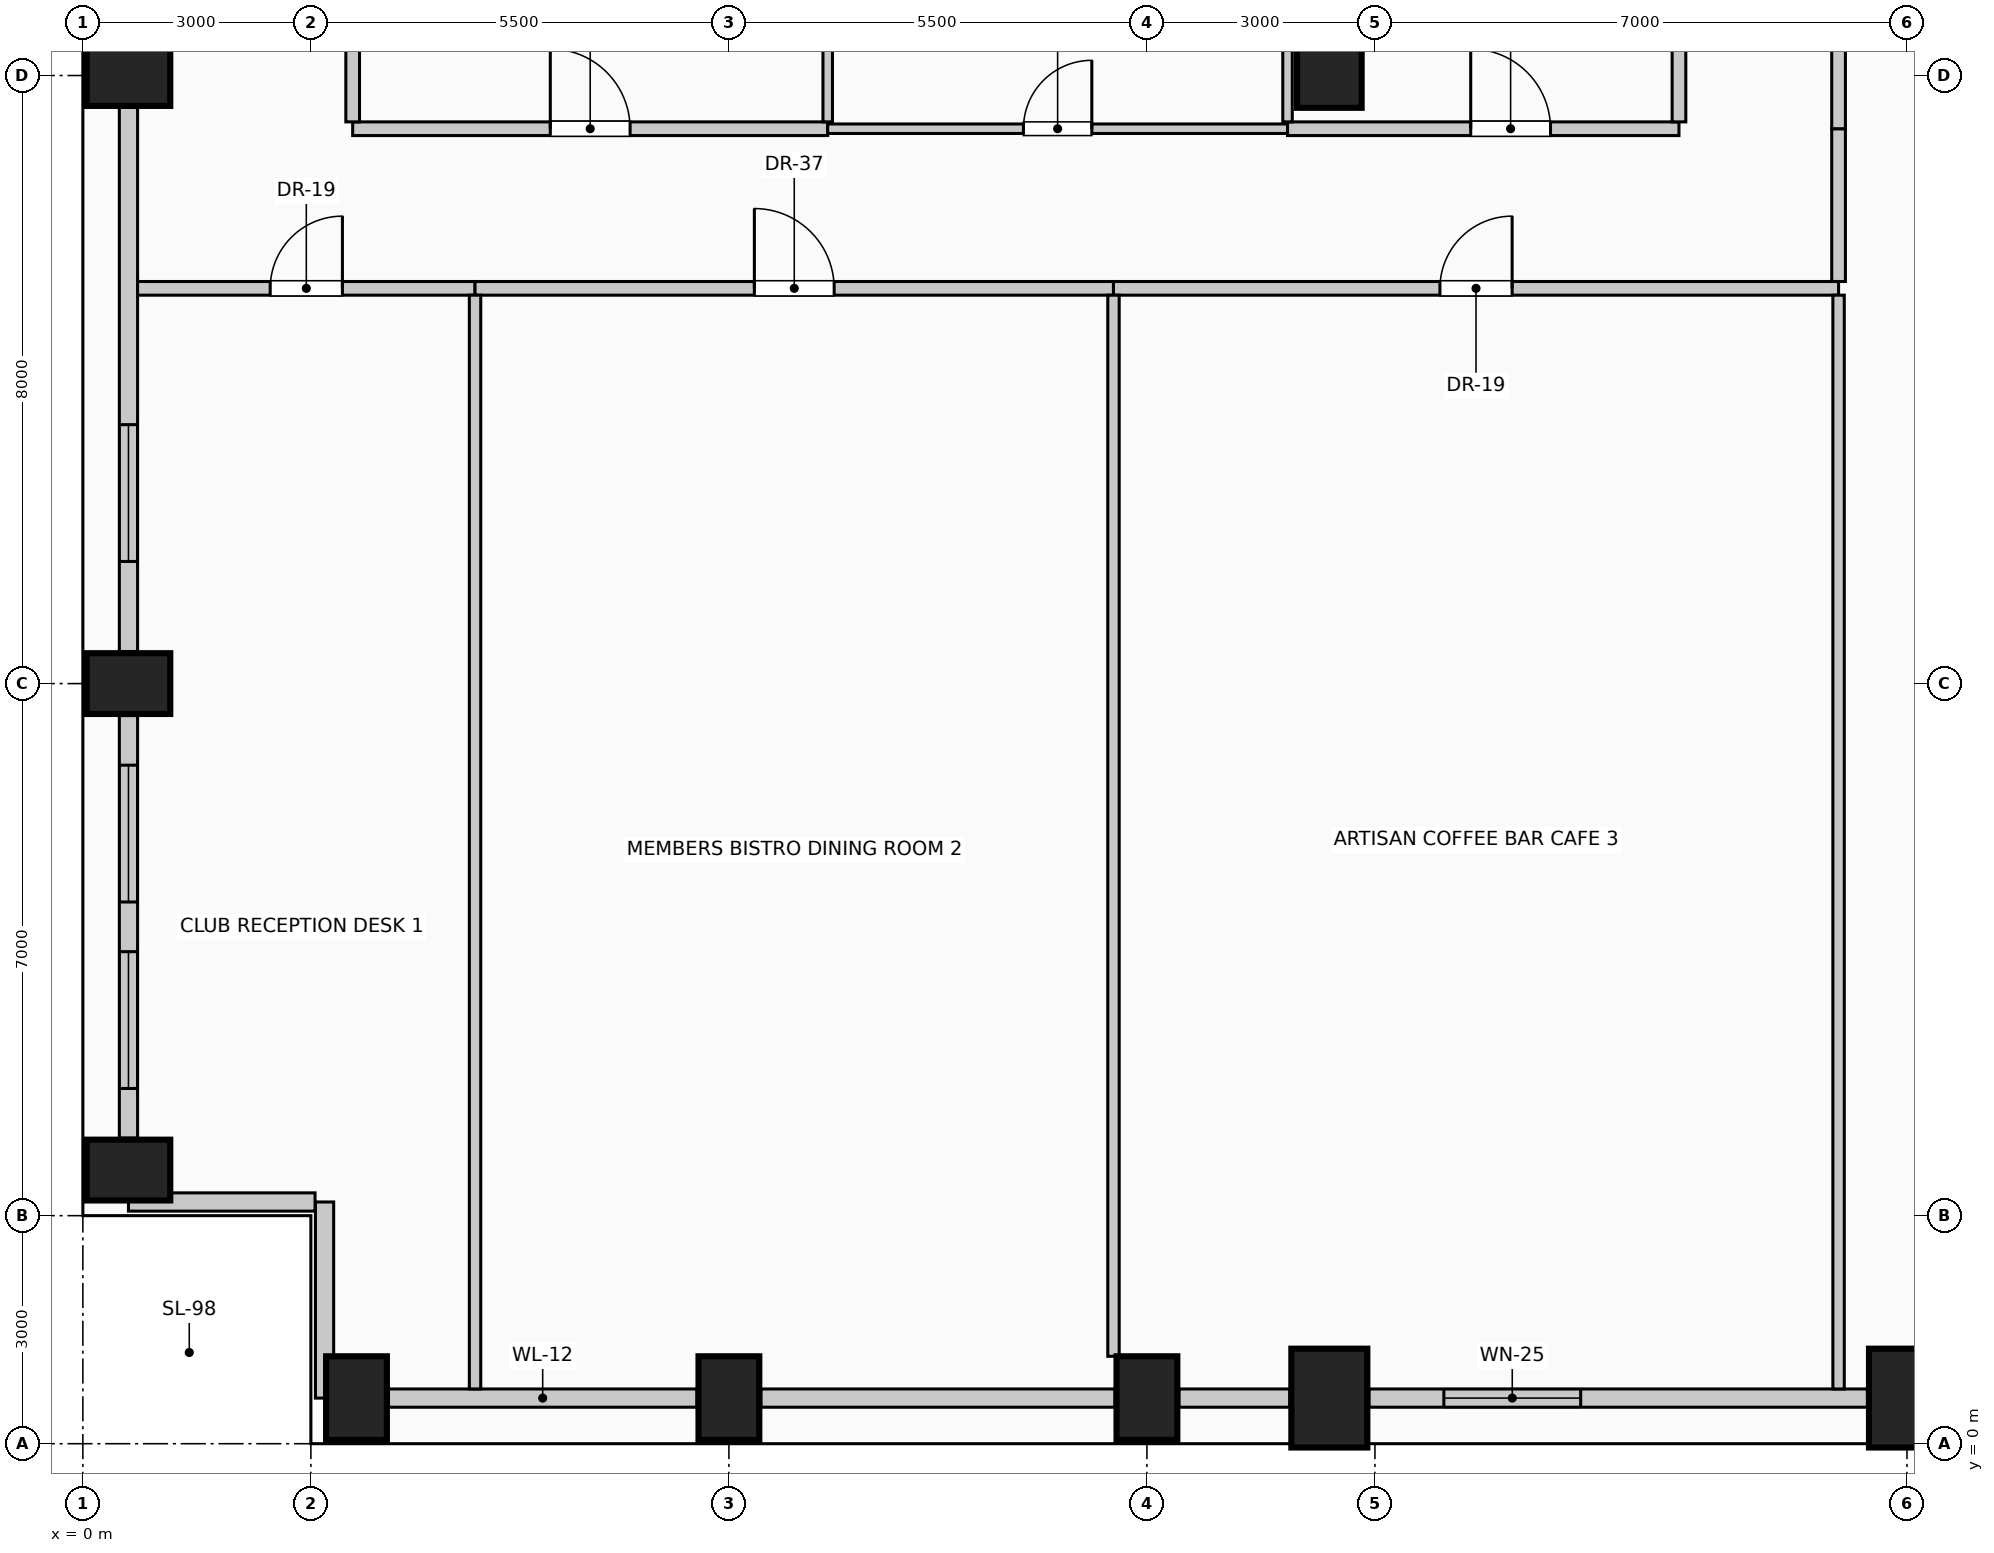
"""IFC4 building model, lengths in metres.
Left out: names, types, materials, properties, quantities, classifications, styles, units other than length and angle.
Written with IfcOpenShell. Run it as: python <this file> out.ifc"""

import sys

from ifc_helpers import new_model, si_unit, direction, frame, frame_2d, origin, origin_2d, place, context, subcontext, project, spatial, rectangle, circle, extrude, element, fill, save


model = new_model("IFC4")
c1 = context("Model", 3, precision=1e-05, world=origin(), true_north=direction((0.0, 1.0)))
c2 = subcontext(c1, "Body", "Model", "MODEL_VIEW")
j1 = project(units=[si_unit("LENGTHUNIT", "METRE"), si_unit("PLANEANGLEUNIT", "RADIAN")], contexts=[c1])
p1 = place(None, origin())
s1 = spatial("IfcSite", under=j1, at=p1, CompositionType="ELEMENT")
p2 = place(p1, origin())
s2 = spatial("IfcBuilding", under=s1, at=p2, CompositionType="ELEMENT")
p3 = place(p2, frame((0.0, 0.0, 174.6)))
s3 = spatial("IfcBuildingStorey", under=s2, at=p3, CompositionType="ELEMENT", Elevation=174.6)
for number, where, z_axis, x_axis in (
    (1, (3.6, 0.6, 0.0), (0.0, 0.0, 1.0), (1.0, 0.0, 0.0)),
    (2, (8.5, 0.6, 0.0), (0.0, 0.0, 1.0), (1.0, 0.0, 0.0)),
    (3, (14.0, 0.6, 0.0), (0.0, 0.0, 1.0), (1.0, 0.0, 0.0)),
):
    element("IfcColumn", number, at=place(p3, frame(where, z_axis=z_axis, x_axis=x_axis)), inside=s3, PredefinedType="COLUMN", context=c2, shape_type="SweptSolid", body=[
        extrude(rectangle(XDim=0.8, YDim=1.1, at=origin_2d()), origin(), (0.0, 0.0, 1.0), 4.0),
    ])
for number, where, z_axis, x_axis in (
    (4, (16.4, 0.6, 0.0), (0.0, 0.0, 1.0), (1.0, 0.0, 0.0)),
    (5, (24.0, 0.6, 0.0), (0.0, 0.0, 1.0), (1.0, 0.0, 0.0)),
):
    element("IfcColumn", number, at=place(p3, frame(where, z_axis=z_axis, x_axis=x_axis)), inside=s3, PredefinedType="COLUMN", context=c2, shape_type="SweptSolid", body=[
        extrude(rectangle(XDim=1.0, YDim=1.3, at=origin_2d()), origin(), (0.0, 0.0, 1.0), 4.0),
    ])
for number, where, z_axis, x_axis in (
    (6, (0.6, 3.6, 0.0), (0.0, 0.0, 1.0), (0.0, 1.0, 0.0)),
    (7, (0.6, 10.0, 0.0), (0.0, 0.0, 1.0), (0.0, 1.0, 0.0)),
    (8, (0.6, 18.0, 0.0), (0.0, 0.0, 1.0), (0.0, 1.0, 0.0)),
):
    element("IfcColumn", number, at=place(p3, frame(where, z_axis=z_axis, x_axis=x_axis)), inside=s3, PredefinedType="COLUMN", context=c2, shape_type="SweptSolid", body=[
        extrude(rectangle(XDim=0.8, YDim=1.1, at=origin_2d()), origin(), (0.0, 0.0, 1.0), 4.0),
    ])
p4 = place(p3, frame((16.4, 18.0, 0.0), z_axis=(0.0, 0.0, 1.0), x_axis=(1.0, 0.0, 0.0)))
e9 = element("IfcColumn", 9, at=p4, inside=s3, PredefinedType="COLUMN", context=c2, shape_type="SweptSolid", body=[
    extrude(circle(Radius=0.425, at=origin_2d()), origin(), (0.0, 0.0, 1.0), 4.0),
])
p5 = place(p3, frame((8.08, 0.6, 0.0), z_axis=(0.0, 0.0, 1.0), x_axis=(-1.0, 0.0, 0.0)))
e10 = element("IfcWall", 10, at=p5, inside=s3, PredefinedType="SOLIDWALL", context=c2, shape_type="SweptSolid", body=[
    extrude(rectangle(XDim=4.06, YDim=0.24, at=frame_2d((2.03, 0.0))), origin(), (0.0, 0.0, 1.0), 2.975),
])
p6 = place(p3, frame((13.58, 0.6, 0.0), z_axis=(0.0, 0.0, 1.0), x_axis=(-1.0, 0.0, 0.0)))
e11 = element("IfcWall", 11, at=p6, inside=s3, PredefinedType="SOLIDWALL", context=c2, shape_type="SweptSolid", body=[
    extrude(rectangle(XDim=4.66, YDim=0.24, at=frame_2d((2.33, 0.0))), origin(), (0.0, 0.0, 1.0), 2.975),
])
p7 = place(p3, frame((15.88, 0.6, 0.0), z_axis=(0.0, 0.0, 1.0), x_axis=(-1.0, 0.0, 0.0)))
e12 = element("IfcWall", 12, at=p7, inside=s3, PredefinedType="SOLIDWALL", context=c2, shape_type="SweptSolid", body=[
    extrude(rectangle(XDim=1.46, YDim=0.24, at=frame_2d((0.73, 0.0))), origin(), (0.0, 0.0, 1.0), 2.975),
])
p8 = place(p3, frame((23.48, 0.6, 0.0), z_axis=(0.0, 0.0, 1.0), x_axis=(-1.0, 0.0, 0.0)))
e13 = element("IfcWall", 13, at=p8, inside=s3, PredefinedType="SOLIDWALL", context=c2, shape_type="SweptSolid", body=[
    extrude(rectangle(XDim=6.56, YDim=0.24, at=frame_2d((3.28, 0.0))), origin(), (0.0, 0.0, 1.0), 2.975),
])
p9 = place(p8, frame((3.773, 0.0, 0.42)))
e14 = element("IfcOpeningElement", 14, at=p9, cuts=e13, PredefinedType="OPENING", context=c2, shape_type="SweptSolid", body=[
    extrude(rectangle(XDim=1.8, YDim=2.2, at=frame_2d((0.9, 1.1))), frame((0.0, 0.13, 0.0), z_axis=(0.0, -1.0, 0.0), x_axis=(1.0, 0.0, 0.0)), (0.0, 0.0, 1.0), 0.26),
])
p10 = place(p3, frame((0.6, 4.02, 0.0), z_axis=(0.0, 0.0, 1.0), x_axis=(0.0, 1.0, 0.0)))
e15 = element("IfcWall", 15, at=p10, inside=s3, PredefinedType="SOLIDWALL", context=c2, shape_type="SweptSolid", body=[
    extrude(rectangle(XDim=5.56, YDim=0.24, at=frame_2d((2.78, 0.0))), origin(), (0.0, 0.0, 1.0), 2.975),
])
p11 = place(p10, frame((0.653, 0.0, 0.42)))
e16 = element("IfcOpeningElement", 16, at=p11, cuts=e15, PredefinedType="OPENING", context=c2, shape_type="SweptSolid", body=[
    extrude(rectangle(XDim=1.8, YDim=2.2, at=frame_2d((0.9, 1.1))), frame((0.0, 0.13, 0.0), z_axis=(0.0, -1.0, 0.0), x_axis=(1.0, 0.0, 0.0)), (0.0, 0.0, 1.0), 0.26),
])
p12 = place(p10, frame((3.107, 0.0, 0.42)))
e17 = element("IfcOpeningElement", 17, at=p12, cuts=e15, PredefinedType="OPENING", context=c2, shape_type="SweptSolid", body=[
    extrude(rectangle(XDim=1.8, YDim=2.2, at=frame_2d((0.9, 1.1))), frame((0.0, 0.13, 0.0), z_axis=(0.0, -1.0, 0.0), x_axis=(1.0, 0.0, 0.0)), (0.0, 0.0, 1.0), 0.26),
])
p13 = place(p3, frame((0.6, 10.42, 0.0), z_axis=(0.0, 0.0, 1.0), x_axis=(0.0, 1.0, 0.0)))
e18 = element("IfcWall", 18, at=p13, inside=s3, PredefinedType="SOLIDWALL", context=c2, shape_type="SweptSolid", body=[
    extrude(rectangle(XDim=7.16, YDim=0.24, at=frame_2d((3.58, 0.0))), origin(), (0.0, 0.0, 1.0), 2.975),
])
p14 = place(p13, frame((1.187, 0.0, 0.42)))
e19 = element("IfcOpeningElement", 19, at=p14, cuts=e18, PredefinedType="OPENING", context=c2, shape_type="SweptSolid", body=[
    extrude(rectangle(XDim=1.8, YDim=2.2, at=frame_2d((0.9, 1.1))), frame((0.0, 0.13, 0.0), z_axis=(0.0, -1.0, 0.0), x_axis=(1.0, 0.0, 0.0)), (0.0, 0.0, 1.0), 0.26),
])
p15 = place(p3, frame((3.18, 0.6, 0.0), z_axis=(0.0, 0.0, 1.0), x_axis=(0.0, 1.0, 0.0)))
e20 = element("IfcWall", 20, at=p15, inside=s3, PredefinedType="SOLIDWALL", context=c2, shape_type="SweptSolid", body=[
    extrude(rectangle(XDim=2.58, YDim=0.24, at=frame_2d((1.29, 0.0))), origin(), (0.0, 0.0, 1.0), 3.725),
])
p16 = place(p3, frame((3.055, 3.18, 0.0), z_axis=(0.0, 0.0, 1.0), x_axis=(-1.0, 0.0, 0.0)))
e21 = element("IfcWall", 21, at=p16, inside=s3, PredefinedType="SOLIDWALL", context=c2, shape_type="SweptSolid", body=[
    extrude(rectangle(XDim=2.455, YDim=0.24, at=frame_2d((1.228, 0.0))), origin(), (0.0, 0.0, 1.0), 3.725),
])
p17 = place(p3, frame((0.72, 15.2, 0.0), z_axis=(0.0, 0.0, 1.0), x_axis=(1.0, 0.0, 0.0)))
e22 = element("IfcWall", 22, at=p17, inside=s3, PredefinedType="PARTITIONING", context=c2, shape_type="SweptSolid", body=[
    extrude(rectangle(XDim=4.44, YDim=0.18, at=frame_2d((2.22, 0.0))), origin(), (0.0, 0.0, 1.0), 3.725),
])
p18 = place(p17, frame((1.745, 0.0, 0.0)))
e23 = element("IfcOpeningElement", 23, at=p18, cuts=e22, PredefinedType="OPENING", context=c2, shape_type="SweptSolid", body=[
    extrude(rectangle(XDim=0.95, YDim=2.15, at=frame_2d((0.475, 1.075))), frame((0.0, 0.1, 0.0), z_axis=(0.0, -1.0, 0.0), x_axis=(1.0, 0.0, 0.0)), (0.0, 0.0, 1.0), 0.2),
])
p19 = place(p3, frame((5.16, 15.2, 0.0), z_axis=(0.0, 0.0, 1.0), x_axis=(1.0, 0.0, 0.0)))
e24 = element("IfcWall", 24, at=p19, inside=s3, PredefinedType="PARTITIONING", context=c2, shape_type="SweptSolid", body=[
    extrude(rectangle(XDim=8.4, YDim=0.18, at=frame_2d((4.2, 0.0))), origin(), (0.0, 0.0, 1.0), 3.725),
])
p20 = place(p19, frame((3.675, 0.0, 0.0)))
e25 = element("IfcOpeningElement", 25, at=p20, cuts=e24, PredefinedType="OPENING", context=c2, shape_type="SweptSolid", body=[
    extrude(rectangle(XDim=1.05, YDim=2.15, at=frame_2d((0.525, 1.075))), frame((0.0, 0.1, 0.0), z_axis=(0.0, -1.0, 0.0), x_axis=(1.0, 0.0, 0.0)), (0.0, 0.0, 1.0), 0.2),
])
p21 = place(p3, frame((13.56, 15.2, 0.0), z_axis=(0.0, 0.0, 1.0), x_axis=(1.0, 0.0, 0.0)))
e26 = element("IfcWall", 26, at=p21, inside=s3, PredefinedType="PARTITIONING", context=c2, shape_type="SweptSolid", body=[
    extrude(rectangle(XDim=9.54, YDim=0.18, at=frame_2d((4.77, 0.0))), origin(), (0.0, 0.0, 1.0), 3.725),
])
p22 = place(p21, frame((4.295, 0.0, 0.0)))
e27 = element("IfcOpeningElement", 27, at=p22, cuts=e26, PredefinedType="OPENING", context=c2, shape_type="SweptSolid", body=[
    extrude(rectangle(XDim=0.95, YDim=2.15, at=frame_2d((0.475, 1.075))), frame((0.0, 0.1, 0.0), z_axis=(0.0, -1.0, 0.0), x_axis=(1.0, 0.0, 0.0)), (0.0, 0.0, 1.0), 0.2),
])
p23 = place(p3, frame((3.55, 17.3, 0.0), z_axis=(0.0, 0.0, 1.0), x_axis=(1.0, 0.0, 0.0)))
e28 = element("IfcWall", 28, at=p23, inside=s3, PredefinedType="PARTITIONING", context=c2, shape_type="SweptSolid", body=[
    extrude(rectangle(XDim=6.25, YDim=0.18, at=frame_2d((3.125, 0.0))), origin(), (0.0, 0.0, 1.0), 3.725),
])
p24 = place(p23, frame((2.6, 0.0, 0.0)))
e29 = element("IfcOpeningElement", 29, at=p24, cuts=e28, PredefinedType="OPENING", context=c2, shape_type="SweptSolid", body=[
    extrude(rectangle(XDim=1.05, YDim=2.15, at=frame_2d((0.525, 1.075))), frame((0.0, 0.1, 0.0), z_axis=(0.0, -1.0, 0.0), x_axis=(1.0, 0.0, 0.0)), (0.0, 0.0, 1.0), 0.2),
])
p25 = place(p3, frame((9.8, 17.3, 0.0), z_axis=(0.0, 0.0, 1.0), x_axis=(1.0, 0.0, 0.0)))
e30 = element("IfcWall", 30, at=p25, inside=s3, PredefinedType="PARTITIONING", context=c2, shape_type="SweptSolid", body=[
    extrude(rectangle(XDim=6.05, YDim=0.125, at=frame_2d((3.025, 0.0))), origin(), (0.0, 0.0, 1.0), 3.725),
])
p26 = place(p25, frame((2.575, 0.0, 0.0)))
e31 = element("IfcOpeningElement", 31, at=p26, cuts=e30, PredefinedType="OPENING", context=c2, shape_type="SweptSolid", body=[
    extrude(rectangle(XDim=0.9, YDim=2.1, at=frame_2d((0.45, 1.05))), frame((0.0, 0.073, 0.0), z_axis=(0.0, -1.0, 0.0), x_axis=(1.0, 0.0, 0.0)), (0.0, 0.0, 1.0), 0.145),
])
p27 = place(p3, frame((15.85, 17.3, 0.0), z_axis=(0.0, 0.0, 1.0), x_axis=(1.0, 0.0, 0.0)))
e32 = element("IfcWall", 32, at=p27, inside=s3, PredefinedType="PARTITIONING", context=c2, shape_type="SweptSolid", body=[
    extrude(rectangle(XDim=5.15, YDim=0.18, at=frame_2d((2.575, 0.0))), origin(), (0.0, 0.0, 1.0), 3.725),
])
p28 = place(p27, frame((2.41, 0.0, 0.0)))
e33 = element("IfcOpeningElement", 33, at=p28, cuts=e32, PredefinedType="OPENING", context=c2, shape_type="SweptSolid", body=[
    extrude(rectangle(XDim=1.05, YDim=2.15, at=frame_2d((0.525, 1.075))), frame((0.0, 0.1, 0.0), z_axis=(0.0, -1.0, 0.0), x_axis=(1.0, 0.0, 0.0)), (0.0, 0.0, 1.0), 0.2),
])
p29 = place(p3, frame((3.55, 17.39, 0.0), z_axis=(0.0, 0.0, 1.0), x_axis=(0.0, 1.0, 0.0)))
e34 = element("IfcWall", 34, at=p29, inside=s3, PredefinedType="PARTITIONING", context=c2, shape_type="SweptSolid", body=[
    extrude(rectangle(XDim=7.335, YDim=0.18, at=frame_2d((3.667, 0.0))), origin(), (0.0, 0.0, 1.0), 3.725),
])
p30 = place(p3, frame((5.16, 0.72, 0.0), z_axis=(0.0, 0.0, 1.0), x_axis=(0.0, 1.0, 0.0)))
e35 = element("IfcWall", 35, at=p30, inside=s3, PredefinedType="PARTITIONING", context=c2, shape_type="SweptSolid", body=[
    extrude(rectangle(XDim=14.39, YDim=0.15, at=frame_2d((7.195, 0.0))), origin(), (0.0, 0.0, 1.0), 3.725),
])
p31 = place(p3, frame((9.8, 17.39, 0.0), z_axis=(0.0, 0.0, 1.0), x_axis=(0.0, 1.0, 0.0)))
e36 = element("IfcWall", 36, at=p31, inside=s3, PredefinedType="PARTITIONING", context=c2, shape_type="SweptSolid", body=[
    extrude(rectangle(XDim=7.335, YDim=0.125, at=frame_2d((3.667, 0.0))), origin(), (0.0, 0.0, 1.0), 3.725),
])
p32 = place(p3, frame((13.56, 1.15, 0.0), z_axis=(0.0, 0.0, 1.0), x_axis=(0.0, 1.0, 0.0)))
e37 = element("IfcWall", 37, at=p32, inside=s3, PredefinedType="PARTITIONING", context=c2, shape_type="SweptSolid", body=[
    extrude(rectangle(XDim=13.96, YDim=0.15, at=frame_2d((6.98, 0.0))), origin(), (0.0, 0.0, 1.0), 3.725),
])
p33 = place(p3, frame((15.85, 17.39, 0.0), z_axis=(0.0, 0.0, 1.0), x_axis=(0.0, 1.0, 0.0)))
e38 = element("IfcWall", 38, at=p33, inside=s3, PredefinedType="PARTITIONING", context=c2, shape_type="SweptSolid", body=[
    extrude(rectangle(XDim=7.335, YDim=0.125, at=frame_2d((3.667, 0.0))), origin(), (0.0, 0.0, 1.0), 3.725),
])
p34 = place(p3, frame((21.0, 17.39, 0.0), z_axis=(0.0, 0.0, 1.0), x_axis=(0.0, 1.0, 0.0)))
e39 = element("IfcWall", 39, at=p34, inside=s3, PredefinedType="PARTITIONING", context=c2, shape_type="SweptSolid", body=[
    extrude(rectangle(XDim=7.335, YDim=0.18, at=frame_2d((3.667, 0.0))), origin(), (0.0, 0.0, 1.0), 3.725),
])
p35 = place(p3, frame((23.1, 0.72, 0.0), z_axis=(0.0, 0.0, 1.0), x_axis=(0.0, 1.0, 0.0)))
e40 = element("IfcWall", 40, at=p35, inside=s3, PredefinedType="PARTITIONING", context=c2, shape_type="SweptSolid", body=[
    extrude(rectangle(XDim=14.39, YDim=0.15, at=frame_2d((7.195, 0.0))), origin(), (0.0, 0.0, 1.0), 3.725),
])
p36 = place(p3, frame((23.1, 15.29, 0.0), z_axis=(0.0, 0.0, 1.0), x_axis=(0.0, 1.0, 0.0)))
e41 = element("IfcWall", 41, at=p36, inside=s3, PredefinedType="PARTITIONING", context=c2, shape_type="SweptSolid", body=[
    extrude(rectangle(XDim=2.01, YDim=0.18, at=frame_2d((1.005, 0.0))), origin(), (0.0, 0.0, 1.0), 3.725),
])
p37 = place(p3, frame((23.1, 17.3, 0.0), z_axis=(0.0, 0.0, 1.0), x_axis=(0.0, 1.0, 0.0)))
e42 = element("IfcWall", 42, at=p37, inside=s3, PredefinedType="PARTITIONING", context=c2, shape_type="SweptSolid", body=[
    extrude(rectangle(XDim=9.51, YDim=0.18, at=frame_2d((4.755, 0.0))), origin(), (0.0, 0.0, 1.0), 3.725),
])
p38 = place(p9, origin())
e43 = element("IfcWindow", 43, at=p38, inside=s3, PartitioningType="SINGLE_PANEL", PredefinedType="WINDOW", context=c2, shape_type="SweptSolid", body=[
    extrude(rectangle(XDim=1.8, YDim=2.2, at=frame_2d((0.9, 1.1))), frame((0.0, 0.03, 0.0), z_axis=(0.0, -1.0, 0.0), x_axis=(1.0, 0.0, 0.0)), (0.0, 0.0, 1.0), 0.06),
])
fill(e14, e43)
p39 = place(p11, origin())
e44 = element("IfcWindow", 44, at=p39, inside=s3, PartitioningType="SINGLE_PANEL", PredefinedType="WINDOW", context=c2, shape_type="SweptSolid", body=[
    extrude(rectangle(XDim=1.8, YDim=2.2, at=frame_2d((0.9, 1.1))), frame((0.0, 0.03, 0.0), z_axis=(0.0, -1.0, 0.0), x_axis=(1.0, 0.0, 0.0)), (0.0, 0.0, 1.0), 0.06),
])
fill(e16, e44)
p40 = place(p12, origin())
e45 = element("IfcWindow", 45, at=p40, inside=s3, PartitioningType="SINGLE_PANEL", PredefinedType="WINDOW", context=c2, shape_type="SweptSolid", body=[
    extrude(rectangle(XDim=1.8, YDim=2.2, at=frame_2d((0.9, 1.1))), frame((0.0, 0.03, 0.0), z_axis=(0.0, -1.0, 0.0), x_axis=(1.0, 0.0, 0.0)), (0.0, 0.0, 1.0), 0.06),
])
fill(e17, e45)
p41 = place(p14, origin())
e46 = element("IfcWindow", 46, at=p41, inside=s3, PartitioningType="SINGLE_PANEL", PredefinedType="WINDOW", context=c2, shape_type="SweptSolid", body=[
    extrude(rectangle(XDim=1.8, YDim=2.2, at=frame_2d((0.9, 1.1))), frame((0.0, 0.03, 0.0), z_axis=(0.0, -1.0, 0.0), x_axis=(1.0, 0.0, 0.0)), (0.0, 0.0, 1.0), 0.06),
])
fill(e19, e46)
p42 = place(p18, origin())
e47 = element("IfcDoor", 47, at=p42, inside=s3, OperationType="SINGLE_SWING_RIGHT", PredefinedType="DOOR", context=c2, shape_type="SweptSolid", body=[
    extrude(rectangle(XDim=0.95, YDim=2.15, at=frame_2d((0.475, 1.075))), frame((0.0, 0.025, 0.0), z_axis=(0.0, -1.0, 0.0), x_axis=(1.0, 0.0, 0.0)), (0.0, 0.0, 1.0), 0.05),
])
fill(e23, e47)
p43 = place(p20, origin())
e48 = element("IfcDoor", 48, at=p43, inside=s3, OperationType="SINGLE_SWING_LEFT", PredefinedType="DOOR", context=c2, shape_type="SweptSolid", body=[
    extrude(rectangle(XDim=1.05, YDim=2.15, at=frame_2d((0.525, 1.075))), frame((0.0, 0.025, 0.0), z_axis=(0.0, -1.0, 0.0), x_axis=(1.0, 0.0, 0.0)), (0.0, 0.0, 1.0), 0.05),
])
fill(e25, e48)
p44 = place(p22, origin())
e49 = element("IfcDoor", 49, at=p44, inside=s3, OperationType="SINGLE_SWING_RIGHT", PredefinedType="DOOR", context=c2, shape_type="SweptSolid", body=[
    extrude(rectangle(XDim=0.95, YDim=2.15, at=frame_2d((0.475, 1.075))), frame((0.0, 0.025, 0.0), z_axis=(0.0, -1.0, 0.0), x_axis=(1.0, 0.0, 0.0)), (0.0, 0.0, 1.0), 0.05),
])
fill(e27, e49)
p45 = place(p24, origin())
e50 = element("IfcDoor", 50, at=p45, inside=s3, OperationType="SINGLE_SWING_LEFT", PredefinedType="DOOR", context=c2, shape_type="SweptSolid", body=[
    extrude(rectangle(XDim=1.05, YDim=2.15, at=frame_2d((0.525, 1.075))), frame((0.0, 0.025, 0.0), z_axis=(0.0, -1.0, 0.0), x_axis=(1.0, 0.0, 0.0)), (0.0, 0.0, 1.0), 0.05),
])
fill(e29, e50)
p46 = place(p26, origin())
e51 = element("IfcDoor", 51, at=p46, inside=s3, OperationType="SINGLE_SWING_RIGHT", PredefinedType="DOOR", context=c2, shape_type="SweptSolid", body=[
    extrude(rectangle(XDim=0.9, YDim=2.1, at=frame_2d((0.45, 1.05))), frame((0.0, 0.025, 0.0), z_axis=(0.0, -1.0, 0.0), x_axis=(1.0, 0.0, 0.0)), (0.0, 0.0, 1.0), 0.05),
])
fill(e31, e51)
p47 = place(p28, origin())
e52 = element("IfcDoor", 52, at=p47, inside=s3, OperationType="SINGLE_SWING_LEFT", PredefinedType="DOOR", context=c2, shape_type="SweptSolid", body=[
    extrude(rectangle(XDim=1.05, YDim=2.15, at=frame_2d((0.525, 1.075))), frame((0.0, 0.025, 0.0), z_axis=(0.0, -1.0, 0.0), x_axis=(1.0, 0.0, 0.0)), (0.0, 0.0, 1.0), 0.05),
])
fill(e33, e52)
save(model, sys.argv[1])
